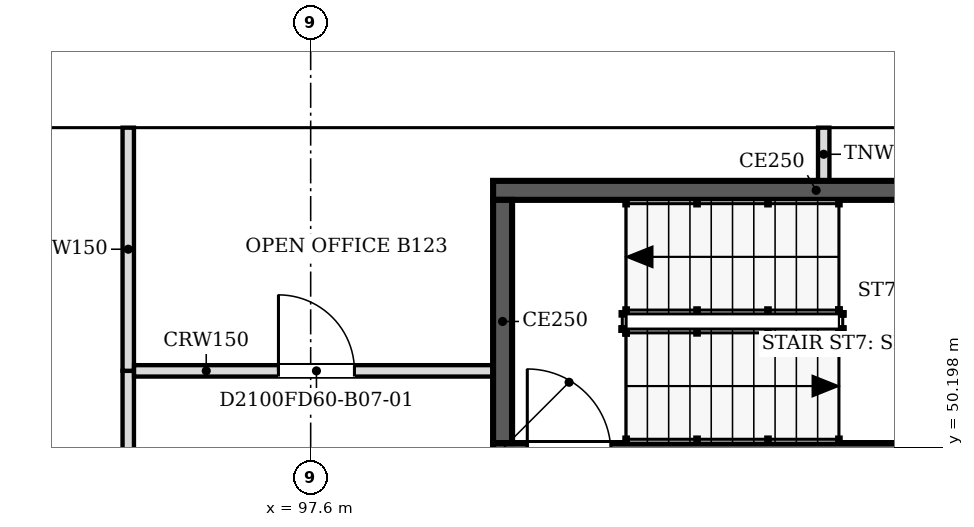
"""IFC4 building model, lengths in metres.
Left out: names, types, materials, properties, quantities, classifications, styles, units other than length and angle.
Written with IfcOpenShell. Run it as: python <this file> out.ifc"""

import sys

from ifc_helpers import new_model, si_unit, direction, frame, frame_2d, origin, place, context, subcontext, project, spatial, polyline, rectangle, outline, extrude, faceted_brep, source, transform, mapped, element, fill, save


model = new_model("IFC4")
c1 = context("Model", 3, precision=1e-05, world=origin(), true_north=direction((0.0, 1.0)))
c2 = subcontext(c1, "Body", "Model", "MODEL_VIEW")
j1 = project(units=[si_unit("LENGTHUNIT", "METRE"), si_unit("PLANEANGLEUNIT", "RADIAN")], contexts=[c1])
p1 = place(None, origin())
s1 = spatial("IfcSite", under=j1, at=p1, CompositionType="ELEMENT")
p2 = place(p1, origin())
s2 = spatial("IfcBuilding", under=s1, at=p2, CompositionType="ELEMENT")
p3 = place(p2, frame((0.0, 0.0, 72.4)))
s3 = spatial("IfcBuildingStorey", under=s2, at=p3, CompositionType="ELEMENT", Elevation=72.4)
m1 = source(origin(), c2, "Body", "SweptSolid", [
    extrude(outline(polyline([(3.05, 0.0), (6.1, 3.8), (3.05, 7.6), (0.0, 3.8), (3.05, 0.0)])), frame((0.0, 0.25, 0.0), z_axis=(0.0, -1.0, 0.0), x_axis=(1.0, 0.0, 0.0)), (0.0, 0.0, 1.0), 0.5),
])
p4 = place(p3, frame((109.8, 54.65, -3.8), z_axis=(0.0, 0.0, 1.0), x_axis=(-1.0, 0.0, 0.0)))
e1 = element("IfcWall", 1, at=p4, inside=s3, PredefinedType="SOLIDWALL", context=c2, shape_type="MappedRepresentation", body=[
    mapped(m1, transform((0.0, 0.0, 0.0), scale=1.0)),
])
m2 = source(origin(), c2, "Body", "SweptSolid", [
    extrude(outline(polyline([(3.05, 0.399), (5.78, 3.8), (3.05, 7.2), (0.321, 3.8), (3.05, 0.399)])), frame((0.0, 0.26, 0.0), z_axis=(0.0, -1.0, 0.0), x_axis=(1.0, 0.0, 0.0)), (0.0, 0.0, 1.0), 0.52),
])
p5 = place(p4, origin())
e2 = element("IfcOpeningElement", 2, at=p5, cuts=e1, PredefinedType="OPENING", context=c2, shape_type="MappedRepresentation", body=[
    mapped(m2, transform((0.0, 0.0, 0.0), scale=1.0)),
])
m3 = source(origin(), c2, "Body", "Brep", [
    faceted_brep([(3.05, -0.25, 0.0), (6.1, -0.25, 3.8), (6.1, -0.25, 3.8), (3.05, -0.25, 7.6), (0.0, -0.25, 3.8), (0.0, 0.25, 3.8), (3.05, 0.25, 7.6), (6.1, 0.25, 3.8), (6.1, 0.25, 3.8), (3.05, 0.25, 0.0)], [[[0, 1, 2, 3, 4]], [[5, 6, 7, 8, 9]], [[9, 8, 1, 0]], [[7, 6, 3, 2]], [[6, 5, 4, 3]], [[5, 9, 0, 4]], [[1, 8, 7, 2]]]),
])
p6 = place(p3, frame((103.7, 54.65, -3.8), z_axis=(0.0, 0.0, 1.0), x_axis=(-1.0, 0.0, 0.0)))
e3 = element("IfcWall", 3, at=p6, inside=s3, PredefinedType="SOLIDWALL", context=c2, shape_type="MappedRepresentation", body=[
    mapped(m3, transform((0.0, 0.0, 0.0), scale=1.0)),
])
p7 = place(p6, origin())
e4 = element("IfcOpeningElement", 4, at=p7, cuts=e3, PredefinedType="OPENING", context=c2, shape_type="MappedRepresentation", body=[
    mapped(m2, transform((0.0, 0.0, 0.0), scale=1.0)),
])
m4 = source(origin(), c2, "Body", "Brep", [
    faceted_brep([(3.05, -0.25, 0.0), (6.053, -0.25, 3.8), (3.05, -0.25, 7.6), (0.0, -0.25, 3.8), (0.0, 0.25, 3.8), (3.05, 0.25, 7.6), (6.007, 0.25, 3.859), (6.007, 0.25, 3.741), (3.05, 0.25, 0.0), (6.053, 0.0, 3.8)], [[[0, 1, 2, 3]], [[4, 5, 6, 7, 8]], [[8, 7, 9, 1, 0]], [[6, 5, 2, 1, 9]], [[5, 4, 3, 2]], [[4, 8, 0, 3]], [[9, 7, 6]]]),
])
p8 = place(p3, frame((97.6, 54.65, -3.8), z_axis=(0.0, 0.0, 1.0), x_axis=(-1.0, 0.0, 0.0)))
e5 = element("IfcWall", 5, at=p8, inside=s3, PredefinedType="SOLIDWALL", context=c2, shape_type="MappedRepresentation", body=[
    mapped(m4, transform((0.0, 0.0, 0.0), scale=1.0)),
])
m5 = source(origin(), c2, "Body", "SweptSolid", [
    extrude(outline(polyline([(3.049, 0.401), (5.735, 3.8), (3.049, 7.199), (0.321, 3.8), (3.049, 0.401)])), frame((0.0, 0.26, 0.0), z_axis=(0.0, -1.0, 0.0), x_axis=(1.0, 0.0, 0.0)), (0.0, 0.0, 1.0), 0.52),
])
p9 = place(p8, origin())
e6 = element("IfcOpeningElement", 6, at=p9, cuts=e5, PredefinedType="OPENING", context=c2, shape_type="MappedRepresentation", body=[
    mapped(m5, transform((0.0, 0.0, 0.0), scale=1.0)),
])
p10 = place(p2, frame((0.0, 0.0, 76.2)))
s4 = spatial("IfcBuildingStorey", under=s2, at=p10, CompositionType="ELEMENT", Elevation=76.2)
m6 = source(origin(), c2, "Body", "SweptSolid", [
    extrude(outline(polyline([(3.05, 0.0), (6.1, 3.8), (3.05, 7.6), (0.0, 3.8), (3.05, 0.0)])), frame((0.0, 0.25, 0.0), z_axis=(0.0, -1.0, 0.0), x_axis=(1.0, 0.0, 0.0)), (0.0, 0.0, 1.0), 0.5),
])
p11 = place(p10, frame((106.75, 54.65, -3.8), z_axis=(0.0, 0.0, 1.0), x_axis=(-1.0, 0.0, 0.0)))
e7 = element("IfcWall", 7, at=p11, inside=s4, PredefinedType="SOLIDWALL", context=c2, shape_type="MappedRepresentation", body=[
    mapped(m6, transform((0.0, 0.0, 0.0), scale=1.0)),
])
m7 = source(origin(), c2, "Body", "SweptSolid", [
    extrude(outline(polyline([(3.05, 0.399), (5.78, 3.8), (3.05, 7.201), (0.321, 3.8), (3.05, 0.399)])), frame((0.0, 0.26, 0.0), z_axis=(0.0, -1.0, 0.0), x_axis=(1.0, 0.0, 0.0)), (0.0, 0.0, 1.0), 0.52),
])
p12 = place(p11, origin())
e8 = element("IfcOpeningElement", 8, at=p12, cuts=e7, PredefinedType="OPENING", context=c2, shape_type="MappedRepresentation", body=[
    mapped(m7, transform((0.0, 0.0, 0.0), scale=1.0)),
])
m8 = source(origin(), c2, "Body", "Brep", [
    faceted_brep([(3.05, -0.25, 0.0), (6.1, -0.25, 3.8), (6.1, -0.25, 3.8), (3.05, -0.25, 7.6), (0.0, -0.25, 3.8), (0.0, 0.25, 3.8), (3.05, 0.25, 7.6), (6.1, 0.25, 3.8), (6.1, 0.25, 3.8), (3.05, 0.25, 0.0)], [[[0, 1, 2, 3, 4]], [[5, 6, 7, 8, 9]], [[9, 8, 1, 0]], [[7, 6, 3, 2]], [[6, 5, 4, 3]], [[5, 9, 0, 4]], [[1, 8, 7, 2]]]),
])
p13 = place(p10, frame((100.65, 54.65, -3.8), z_axis=(0.0, 0.0, 1.0), x_axis=(-1.0, 0.0, 0.0)))
e9 = element("IfcWall", 9, at=p13, inside=s4, PredefinedType="SOLIDWALL", context=c2, shape_type="MappedRepresentation", body=[
    mapped(m8, transform((0.0, 0.0, 0.0), scale=1.0)),
])
p14 = place(p13, origin())
e10 = element("IfcOpeningElement", 10, at=p14, cuts=e9, PredefinedType="OPENING", context=c2, shape_type="MappedRepresentation", body=[
    mapped(m7, transform((0.0, 0.0, 0.0), scale=1.0)),
])
m9 = source(origin(), c2, "Body", "Brep", [
    faceted_brep([(3.003, -0.25, 0.0), (3.05, -0.25, 0.06), (3.05, -0.25, 7.54), (3.003, -0.25, 7.6), (0.0, -0.25, 3.8), (0.0, 0.25, 3.8), (2.957, 0.25, 7.541), (2.957, 0.25, 0.059), (3.003, 0.0, 0.0), (3.003, 0.0, 7.6)], [[[0, 1, 2, 3, 4]], [[5, 6, 7]], [[1, 0, 8]], [[9, 3, 2]], [[6, 5, 4, 3, 9]], [[5, 7, 8, 0, 4]], [[1, 8, 7, 6, 9, 2]]]),
])
p15 = place(p10, frame((94.55, 54.65, -3.8), z_axis=(0.0, 0.0, 1.0), x_axis=(-1.0, 0.0, 0.0)))
e11 = element("IfcWall", 11, at=p15, inside=s4, PredefinedType="SOLIDWALL", context=c2, shape_type="MappedRepresentation", body=[
    mapped(m9, transform((0.0, 0.0, 0.0), scale=1.0)),
])
m10 = source(origin(), c2, "Body", "SweptSolid", [
    extrude(outline(polyline([(2.803, 6.944), (0.319, 3.8), (2.803, 0.656), (2.803, 6.944)])), frame((0.0, 0.26, 0.0), z_axis=(0.0, -1.0, 0.0), x_axis=(1.0, 0.0, 0.0)), (0.0, 0.0, 1.0), 0.52),
])
p16 = place(p15, origin())
e12 = element("IfcOpeningElement", 12, at=p16, cuts=e11, PredefinedType="OPENING", context=c2, shape_type="MappedRepresentation", body=[
    mapped(m10, transform((0.0, 0.0, 0.0), scale=1.0)),
])
p17 = place(p3, frame((108.5, 50.125, 0.0), z_axis=(0.0, 0.0, 1.0), x_axis=(-1.0, 0.0, 0.0)))
e13 = element("IfcWall", 13, at=p17, inside=s3, PredefinedType="SOLIDWALL", context=c2, shape_type="SweptSolid", body=[
    extrude(rectangle(XDim=8.5, YDim=0.25, at=frame_2d((4.25, 0.0))), origin(), (0.0, 0.0, 1.0), 3.8),
])
m11 = source(origin(), c2, "Body", "SweptSolid", [
    extrude(rectangle(XDim=1.1, YDim=2.1, at=frame_2d((0.55, 1.05))), frame((0.0, 0.135, 0.0), z_axis=(0.0, -1.0, 0.0), x_axis=(1.0, 0.0, 0.0)), (0.0, 0.0, 1.0), 0.27),
])
p18 = place(p17, frame((6.95, 0.0, 0.0)))
e14 = element("IfcOpeningElement", 14, at=p18, cuts=e13, PredefinedType="OPENING", context=c2, shape_type="MappedRepresentation", body=[
    mapped(m11, transform((0.0, 0.0, 0.0), scale=1.0)),
])
p19 = place(p3, frame((100.125, 50.25, 0.0), z_axis=(0.0, 0.0, 1.0), x_axis=(0.0, 1.0, 0.0)))
e15 = element("IfcWall", 15, at=p19, inside=s3, PredefinedType="SOLIDWALL", context=c2, shape_type="SweptSolid", body=[
    extrude(rectangle(XDim=3.2, YDim=0.25, at=frame_2d((1.6, 0.0))), origin(), (0.0, 0.0, 1.0), 3.8),
])
p20 = place(p3, frame((100.0, 53.575, 0.0), z_axis=(0.0, 0.0, 1.0), x_axis=(1.0, 0.0, 0.0)))
e16 = element("IfcWall", 16, at=p20, inside=s3, PredefinedType="SOLIDWALL", context=c2, shape_type="SweptSolid", body=[
    extrude(rectangle(XDim=8.5, YDim=0.25, at=frame_2d((4.25, 0.0))), origin(), (0.0, 0.0, 1.0), 3.8),
])
p21 = place(p3, frame((95.2, 36.6, 0.0), z_axis=(0.0, 0.0, 1.0), x_axis=(0.0, 1.0, 0.0)))
e17 = element("IfcWall", 17, at=p21, inside=s3, PredefinedType="PARTITIONING", context=c2, shape_type="SweptSolid", body=[
    extrude(rectangle(XDim=14.6, YDim=0.15, at=frame_2d((7.3, 0.0))), origin(), (0.0, 0.0, 1.0), 3.067),
])
m12 = source(origin(), c2, "Body", "SweptSolid", [
    extrude(rectangle(XDim=0.9, YDim=2.1, at=frame_2d((0.45, 1.05))), frame((0.0, 0.085, 0.0), z_axis=(0.0, -1.0, 0.0), x_axis=(1.0, 0.0, 0.0)), (0.0, 0.0, 1.0), 0.17),
])
p22 = place(p21, frame((11.301, 0.0, 0.0)))
e18 = element("IfcOpeningElement", 18, at=p22, cuts=e17, PredefinedType="OPENING", context=c2, shape_type="MappedRepresentation", body=[
    mapped(m12, transform((0.0, 0.0, 0.0), scale=1.0)),
])
p23 = place(p3, frame((95.2, 51.201, 0.0), z_axis=(0.0, 0.0, 1.0), x_axis=(0.0, 1.0, 0.0)))
e19 = element("IfcWall", 19, at=p23, inside=s3, PredefinedType="PARTITIONING", context=c2, shape_type="SweptSolid", body=[
    extrude(rectangle(XDim=3.199, YDim=0.15, at=frame_2d((1.6, 0.0))), origin(), (0.0, 0.0, 1.0), 3.067),
])
p24 = place(p3, frame((95.276, 51.2, 0.0), z_axis=(0.0, 0.0, 1.0), x_axis=(1.0, 0.0, 0.0)))
e20 = element("IfcWall", 20, at=p24, inside=s3, PredefinedType="PARTITIONING", context=c2, shape_type="SweptSolid", body=[
    extrude(rectangle(XDim=4.724, YDim=0.15, at=frame_2d((2.362, 0.0))), origin(), (0.0, 0.0, 1.0), 3.067),
])
m13 = source(origin(), c2, "Body", "SweptSolid", [
    extrude(rectangle(XDim=1.0, YDim=2.1, at=frame_2d((0.5, 1.05))), frame((0.0, 0.085, 0.0), z_axis=(0.0, -1.0, 0.0), x_axis=(1.0, 0.0, 0.0)), (0.0, 0.0, 1.0), 0.17),
])
p25 = place(p24, frame((1.9, 0.0, 0.0)))
e21 = element("IfcOpeningElement", 21, at=p25, cuts=e20, PredefinedType="OPENING", context=c2, shape_type="MappedRepresentation", body=[
    mapped(m13, transform((0.0, 0.0, 0.0), scale=1.0)),
])
p26 = place(p3, frame((104.35, 53.7, 0.0), z_axis=(0.0, 0.0, 1.0), x_axis=(0.0, 1.0, 0.0)))
e22 = element("IfcWall", 22, at=p26, inside=s3, PredefinedType="PARTITIONING", context=c2, shape_type="SweptSolid", body=[
    extrude(rectangle(XDim=0.7, YDim=0.15, at=frame_2d((0.35, 0.0))), origin(), (0.0, 0.0, 1.0), 3.067),
])
m14 = source(origin(), c2, "Body", "SweptSolid", [
    extrude(rectangle(XDim=1.0, YDim=2.1, at=frame_2d((0.5, 1.05))), frame((0.0, 0.025, 0.0), z_axis=(0.0, -1.0, 0.0), x_axis=(1.0, 0.0, 0.0)), (0.0, 0.0, 1.0), 0.05),
])
p27 = place(p25, origin())
e23 = element("IfcDoor", 23, at=p27, inside=s3, OperationType="SINGLE_SWING_LEFT", PredefinedType="DOOR", context=c2, shape_type="MappedRepresentation", body=[
    mapped(m14, transform((0.0, 0.0, 0.0), scale=1.0)),
])
fill(e21, e23)
save(model, sys.argv[1])
